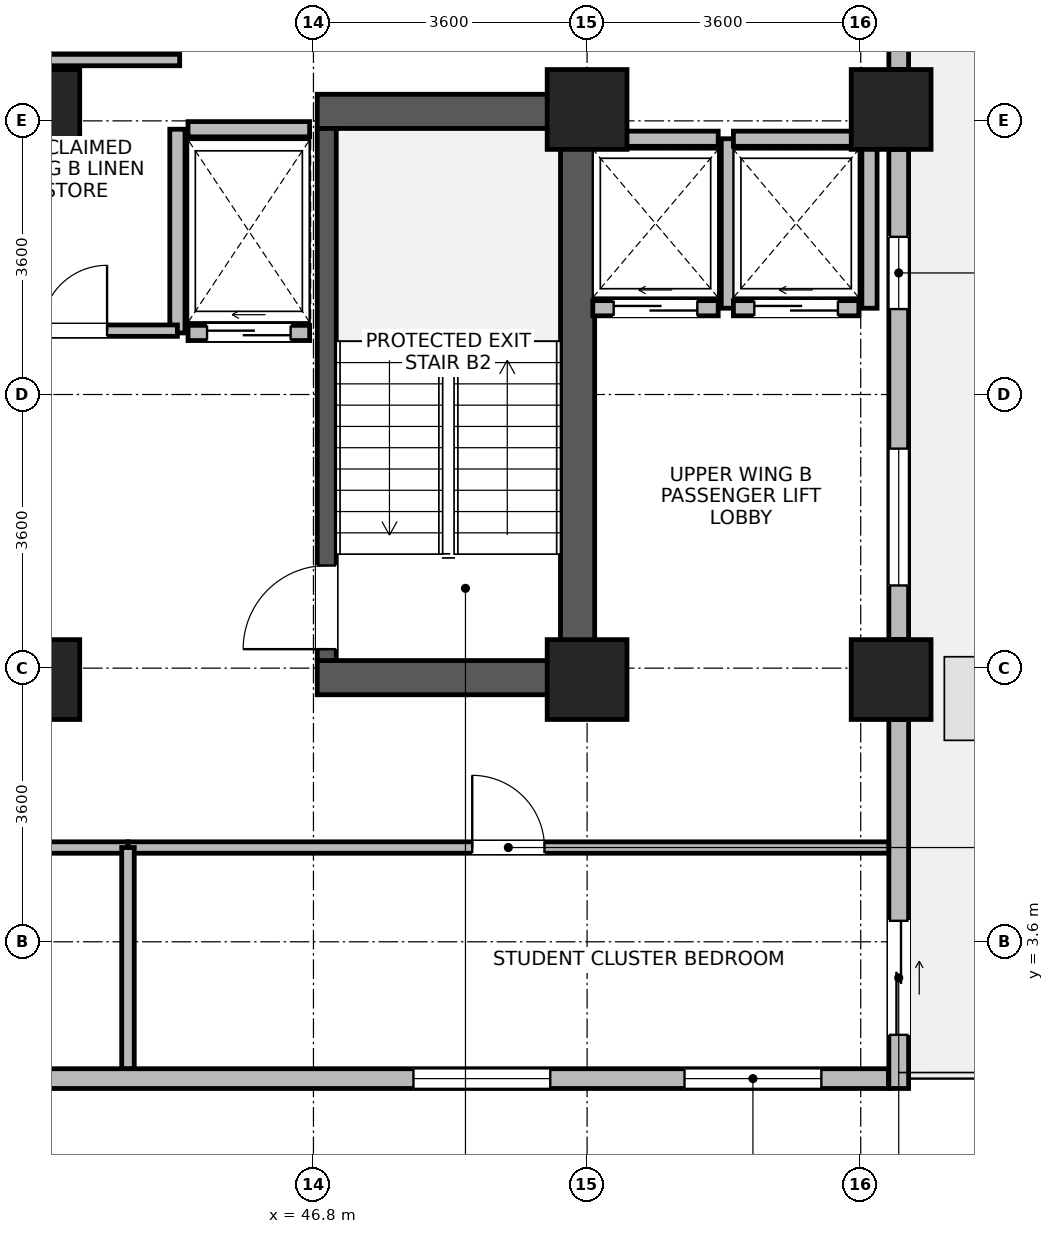
"""IFC4 building model, lengths in metres.
Left out: names, types, materials, properties, quantities, classifications, styles, units other than length and angle.
Written with IfcOpenShell. Run it as: python <this file> out.ifc"""

import sys

from ifc_helpers import new_model, si_unit, direction, frame, frame_2d, origin, origin_2d, place, context, subcontext, project, spatial, rectangle, extrude, source, transform, mapped, element, fill, save


model = new_model("IFC4")
c1 = context("Model", 3, precision=1e-05, world=origin(), true_north=direction((0.0, 1.0)))
c2 = subcontext(c1, "Body", "Model", "MODEL_VIEW")
j1 = project(units=[si_unit("LENGTHUNIT", "METRE"), si_unit("PLANEANGLEUNIT", "RADIAN")], contexts=[c1])
p1 = place(None, origin())
s1 = spatial("IfcSite", under=j1, at=p1, CompositionType="ELEMENT")
p2 = place(p1, origin())
s2 = spatial("IfcBuilding", under=s1, at=p2, CompositionType="ELEMENT")
p3 = place(p2, frame((0.0, 0.0, 188.3)))
s3 = spatial("IfcBuildingStorey", under=s2, at=p3, CompositionType="ELEMENT", Elevation=188.3)
p4 = place(p3, frame((50.275, 6.85, 0.0), z_axis=(0.0, 0.0, 1.0), x_axis=(0.0, 1.0, 0.0)))
e1 = element("IfcWall", 1, at=p4, inside=s3, PredefinedType="SHEAR", context=c2, shape_type="SweptSolid", body=[
    extrude(rectangle(XDim=7.9, YDim=0.45, at=frame_2d((3.95, 0.0))), origin(), (0.0, 0.0, 1.0), 3.34),
])
for number, where, z_axis, x_axis in (
    (2, (46.85, 7.075, 0.0), (0.0, 0.0, 1.0), (1.0, 0.0, 0.0)),
    (3, (46.85, 14.525, 0.0), (0.0, 0.0, 1.0), (1.0, 0.0, 0.0)),
):
    element("IfcWall", number, at=place(p3, frame(where, z_axis=z_axis, x_axis=x_axis)), inside=s3, PredefinedType="SHEAR", context=c2, shape_type="SweptSolid", body=[
        extrude(rectangle(XDim=3.2, YDim=0.45, at=frame_2d((1.6, 0.0))), origin(), (0.0, 0.0, 1.0), 3.34),
    ])
p5 = place(p3, frame((46.975, 7.3, 0.0), z_axis=(0.0, 0.0, 1.0), x_axis=(0.0, 1.0, 0.0)))
e4 = element("IfcWall", 4, at=p5, inside=s3, PredefinedType="SHEAR", context=c2, shape_type="SweptSolid", body=[
    extrude(rectangle(XDim=7.0, YDim=0.25, at=frame_2d((3.5, 0.0))), origin(), (0.0, 0.0, 1.0), 3.34),
])
p6 = place(p5, frame((0.15, 0.0, 0.0)))
e5 = element("IfcOpeningElement", 5, at=p6, cuts=e4, PredefinedType="OPENING", context=c2, shape_type="SweptSolid", body=[
    extrude(rectangle(XDim=1.1, YDim=2.08, at=frame_2d((0.55, 1.04))), frame((0.0, 0.135, 0.0), z_axis=(0.0, -1.0, 0.0), x_axis=(1.0, 0.0, 0.0)), (0.0, 0.0, 1.0), 0.27),
])
m1 = source(origin(), c2, "Body", "SweptSolid", [
    extrude(rectangle(XDim=1.05, YDim=1.05, at=origin_2d()), origin(), (0.0, 0.0, 1.0), 3.7),
])
for number, where, z_axis, x_axis in (
    (6, (43.2, 7.05, 0.0), (0.0, 0.0, 1.0), (1.0, 0.0, 0.0)),
    (7, (43.2, 14.55, 0.0), (0.0, 0.0, 1.0), (1.0, 0.0, 0.0)),
    (8, (50.4, 7.05, 0.0), (0.0, 0.0, 1.0), (1.0, 0.0, 0.0)),
    (9, (50.4, 14.55, 0.0), (0.0, 0.0, 1.0), (1.0, 0.0, 0.0)),
    (10, (54.4, 7.05, 0.0), (0.0, 0.0, 1.0), (1.0, 0.0, 0.0)),
    (11, (54.4, 14.55, 0.0), (0.0, 0.0, 1.0), (1.0, 0.0, 0.0)),
):
    element("IfcColumn", number, at=place(p3, frame(where, z_axis=z_axis, x_axis=x_axis)), inside=s3, PredefinedType="COLUMN", context=c2, shape_type="MappedRepresentation", body=[
        mapped(m1, transform((0.0, 0.0, 0.0), x_axis=(1.0, 0.0, 0.0), y_axis=(0.0, 1.0, 0.0), z_axis=(0.0, 0.0, 1.0), scale=1.0)),
    ])
p7 = place(p3, frame((54.365, 1.8, 0.0), z_axis=(0.0, 0.0, 1.0), x_axis=(-1.0, 0.0, 0.0)))
e12 = element("IfcWall", 12, at=p7, inside=s3, PredefinedType="STANDARD", context=c2, shape_type="SweptSolid", body=[
    extrude(rectangle(XDim=28.53, YDim=0.26, at=frame_2d((14.265, 0.0))), origin(), (0.0, 0.0, 1.0), 3.32),
])
p8 = place(p7, frame((0.883, 0.0, 0.85)))
e13 = element("IfcOpeningElement", 13, at=p8, cuts=e12, PredefinedType="OPENING", context=c2, shape_type="SweptSolid", body=[
    extrude(rectangle(XDim=1.8, YDim=1.85, at=frame_2d((0.9, 0.925))), frame((0.0, 0.14, 0.0), z_axis=(0.0, -1.0, 0.0), x_axis=(1.0, 0.0, 0.0)), (0.0, 0.0, 1.0), 0.28),
])
p9 = place(p7, frame((4.449, 0.0, 0.85)))
e14 = element("IfcOpeningElement", 14, at=p9, cuts=e12, PredefinedType="OPENING", context=c2, shape_type="SweptSolid", body=[
    extrude(rectangle(XDim=1.8, YDim=1.85, at=frame_2d((0.9, 0.925))), frame((0.0, 0.14, 0.0), z_axis=(0.0, -1.0, 0.0), x_axis=(1.0, 0.0, 0.0)), (0.0, 0.0, 1.0), 0.28),
])
p10 = place(p7, frame((11.582, 0.0, 0.85)))
e15 = element("IfcOpeningElement", 15, at=p10, cuts=e12, PredefinedType="OPENING", context=c2, shape_type="SweptSolid", body=[
    extrude(rectangle(XDim=1.8, YDim=1.85, at=frame_2d((0.9, 0.925))), frame((0.0, 0.14, 0.0), z_axis=(0.0, -1.0, 0.0), x_axis=(1.0, 0.0, 0.0)), (0.0, 0.0, 1.0), 0.28),
])
p11 = place(p7, frame((15.148, 0.0, 0.85)))
e16 = element("IfcOpeningElement", 16, at=p11, cuts=e12, PredefinedType="OPENING", context=c2, shape_type="SweptSolid", body=[
    extrude(rectangle(XDim=1.8, YDim=1.85, at=frame_2d((0.9, 0.925))), frame((0.0, 0.14, 0.0), z_axis=(0.0, -1.0, 0.0), x_axis=(1.0, 0.0, 0.0)), (0.0, 0.0, 1.0), 0.28),
])
p12 = place(p7, frame((18.714, 0.0, 0.85)))
e17 = element("IfcOpeningElement", 17, at=p12, cuts=e12, PredefinedType="OPENING", context=c2, shape_type="SweptSolid", body=[
    extrude(rectangle(XDim=1.8, YDim=1.85, at=frame_2d((0.9, 0.925))), frame((0.0, 0.14, 0.0), z_axis=(0.0, -1.0, 0.0), x_axis=(1.0, 0.0, 0.0)), (0.0, 0.0, 1.0), 0.28),
])
p13 = place(p7, frame((22.281, 0.0, 0.85)))
e18 = element("IfcOpeningElement", 18, at=p13, cuts=e12, PredefinedType="OPENING", context=c2, shape_type="SweptSolid", body=[
    extrude(rectangle(XDim=1.8, YDim=1.85, at=frame_2d((0.9, 0.925))), frame((0.0, 0.14, 0.0), z_axis=(0.0, -1.0, 0.0), x_axis=(1.0, 0.0, 0.0)), (0.0, 0.0, 1.0), 0.28),
])
p14 = place(p7, frame((25.847, 0.0, 0.85)))
e19 = element("IfcOpeningElement", 19, at=p14, cuts=e12, PredefinedType="OPENING", context=c2, shape_type="SweptSolid", body=[
    extrude(rectangle(XDim=1.8, YDim=1.85, at=frame_2d((0.9, 0.925))), frame((0.0, 0.14, 0.0), z_axis=(0.0, -1.0, 0.0), x_axis=(1.0, 0.0, 0.0)), (0.0, 0.0, 1.0), 0.28),
])
p15 = place(p3, frame((54.5, 6.524, 0.0), z_axis=(0.0, 0.0, 1.0), x_axis=(0.0, -1.0, 0.0)))
e20 = element("IfcWall", 20, at=p15, inside=s3, PredefinedType="STANDARD", context=c2, shape_type="SweptSolid", body=[
    extrude(rectangle(XDim=4.854, YDim=0.26, at=frame_2d((2.427, 0.0))), origin(), (0.0, 0.0, 1.0), 3.32),
])
p16 = place(p15, frame((2.648, 0.0, 0.0)))
e21 = element("IfcOpeningElement", 21, at=p16, cuts=e20, PredefinedType="OPENING", context=c2, shape_type="SweptSolid", body=[
    extrude(rectangle(XDim=1.5, YDim=2.15, at=frame_2d((0.75, 1.075))), frame((0.0, 0.14, 0.0), z_axis=(0.0, -1.0, 0.0), x_axis=(1.0, 0.0, 0.0)), (0.0, 0.0, 1.0), 0.28),
])
p17 = place(p3, frame((54.5, 14.024, 0.0), z_axis=(0.0, 0.0, 1.0), x_axis=(0.0, -1.0, 0.0)))
e22 = element("IfcWall", 22, at=p17, inside=s3, PredefinedType="STANDARD", context=c2, shape_type="SweptSolid", body=[
    extrude(rectangle(XDim=6.448, YDim=0.26, at=frame_2d((3.224, 0.0))), origin(), (0.0, 0.0, 1.0), 2.87),
])
p18 = place(p17, frame((3.936, 0.0, 0.85)))
e23 = element("IfcOpeningElement", 23, at=p18, cuts=e22, PredefinedType="OPENING", context=c2, shape_type="SweptSolid", body=[
    extrude(rectangle(XDim=1.8, YDim=1.85, at=frame_2d((0.9, 0.925))), frame((0.0, 0.14, 0.0), z_axis=(0.0, -1.0, 0.0), x_axis=(1.0, 0.0, 0.0)), (0.0, 0.0, 1.0), 0.28),
])
p19 = place(p17, frame((1.15, 0.0, 0.85)))
e24 = element("IfcOpeningElement", 24, at=p19, cuts=e22, PredefinedType="OPENING", context=c2, shape_type="SweptSolid", body=[
    extrude(rectangle(XDim=0.95, YDim=1.75, at=frame_2d((0.475, 0.875))), frame((0.0, 0.14, 0.0), z_axis=(0.0, -1.0, 0.0), x_axis=(1.0, 0.0, 0.0)), (0.0, 0.0, 1.0), 0.28),
])
p20 = place(p3, frame((54.5, 21.074, 0.0), z_axis=(0.0, 0.0, 1.0), x_axis=(0.0, -1.0, 0.0)))
e25 = element("IfcWall", 25, at=p20, inside=s3, PredefinedType="STANDARD", context=c2, shape_type="SweptSolid", body=[
    extrude(rectangle(XDim=5.998, YDim=0.26, at=frame_2d((2.999, 0.0))), origin(), (0.0, 0.0, 1.0), 2.87),
])
p21 = place(p20, frame((0.6, 0.0, 0.85)))
e26 = element("IfcOpeningElement", 26, at=p21, cuts=e25, PredefinedType="OPENING", context=c2, shape_type="SweptSolid", body=[
    extrude(rectangle(XDim=1.8, YDim=1.85, at=frame_2d((0.9, 0.925))), frame((0.0, 0.14, 0.0), z_axis=(0.0, -1.0, 0.0), x_axis=(1.0, 0.0, 0.0)), (0.0, 0.0, 1.0), 0.28),
])
p22 = place(p3, frame((50.475, 11.935, 0.0), z_axis=(0.0, 0.0, 1.0), x_axis=(1.0, 0.0, 0.0)))
e27 = element("IfcWall", 27, at=p22, inside=s3, PredefinedType="PARTITIONING", context=c2, shape_type="SweptSolid", body=[
    extrude(rectangle(XDim=1.65, YDim=0.2, at=frame_2d((0.825, 0.0))), origin(), (0.0, 0.0, 1.0), 3.32),
])
p23 = place(p22, frame((0.275, 0.0, 0.0)))
e28 = element("IfcOpeningElement", 28, at=p23, cuts=e27, PredefinedType="OPENING", context=c2, shape_type="SweptSolid", body=[
    extrude(rectangle(XDim=1.1, YDim=2.12, at=frame_2d((0.55, 1.06))), frame((0.0, 0.11, 0.0), z_axis=(0.0, -1.0, 0.0), x_axis=(1.0, 0.0, 0.0)), (0.0, 0.0, 1.0), 0.22),
])
p24 = place(p3, frame((50.475, 14.165, 0.0), z_axis=(0.0, 0.0, 1.0), x_axis=(1.0, 0.0, 0.0)))
e29 = element("IfcWall", 29, at=p24, inside=s3, PredefinedType="PARTITIONING", context=c2, shape_type="SweptSolid", body=[
    extrude(rectangle(XDim=1.65, YDim=0.2, at=frame_2d((0.825, 0.0))), origin(), (0.0, 0.0, 1.0), 3.32),
])
p25 = place(p3, frame((52.265, 11.935, 0.0), z_axis=(0.0, 0.0, 1.0), x_axis=(0.0, 1.0, 0.0)))
e30 = element("IfcWall", 30, at=p25, inside=s3, PredefinedType="PARTITIONING", context=c2, shape_type="SweptSolid", body=[
    extrude(rectangle(XDim=2.23, YDim=0.2, at=frame_2d((1.115, 0.0))), origin(), (0.0, 0.0, 1.0), 3.32),
])
p26 = place(p3, frame((52.325, 11.935, 0.0), z_axis=(0.0, 0.0, 1.0), x_axis=(1.0, 0.0, 0.0)))
e31 = element("IfcWall", 31, at=p26, inside=s3, PredefinedType="PARTITIONING", context=c2, shape_type="SweptSolid", body=[
    extrude(rectangle(XDim=1.65, YDim=0.2, at=frame_2d((0.825, 0.0))), origin(), (0.0, 0.0, 1.0), 3.32),
])
p27 = place(p26, frame((0.275, 0.0, 0.0)))
e32 = element("IfcOpeningElement", 32, at=p27, cuts=e31, PredefinedType="OPENING", context=c2, shape_type="SweptSolid", body=[
    extrude(rectangle(XDim=1.1, YDim=2.12, at=frame_2d((0.55, 1.06))), frame((0.0, 0.11, 0.0), z_axis=(0.0, -1.0, 0.0), x_axis=(1.0, 0.0, 0.0)), (0.0, 0.0, 1.0), 0.22),
])
p28 = place(p3, frame((52.325, 14.165, 0.0), z_axis=(0.0, 0.0, 1.0), x_axis=(1.0, 0.0, 0.0)))
e33 = element("IfcWall", 33, at=p28, inside=s3, PredefinedType="PARTITIONING", context=c2, shape_type="SweptSolid", body=[
    extrude(rectangle(XDim=1.65, YDim=0.2, at=frame_2d((0.825, 0.0))), origin(), (0.0, 0.0, 1.0), 3.32),
])
p29 = place(p3, frame((54.115, 11.935, 0.0), z_axis=(0.0, 0.0, 1.0), x_axis=(0.0, 1.0, 0.0)))
e34 = element("IfcWall", 34, at=p29, inside=s3, PredefinedType="PARTITIONING", context=c2, shape_type="SweptSolid", body=[
    extrude(rectangle(XDim=2.23, YDim=0.2, at=frame_2d((1.115, 0.0))), origin(), (0.0, 0.0, 1.0), 2.87),
])
p30 = place(p3, frame((45.15, 11.61, 0.0), z_axis=(0.0, 0.0, 1.0), x_axis=(1.0, 0.0, 0.0)))
e35 = element("IfcWall", 35, at=p30, inside=s3, PredefinedType="PARTITIONING", context=c2, shape_type="SweptSolid", body=[
    extrude(rectangle(XDim=1.6, YDim=0.2, at=frame_2d((0.8, 0.0))), origin(), (0.0, 0.0, 1.0), 3.32),
])
p31 = place(p30, frame((0.25, 0.0, 0.0)))
e36 = element("IfcOpeningElement", 36, at=p31, cuts=e35, PredefinedType="OPENING", context=c2, shape_type="SweptSolid", body=[
    extrude(rectangle(XDim=1.1, YDim=2.12, at=frame_2d((0.55, 1.06))), frame((0.0, 0.11, 0.0), z_axis=(0.0, -1.0, 0.0), x_axis=(1.0, 0.0, 0.0)), (0.0, 0.0, 1.0), 0.22),
])
p32 = place(p3, frame((45.15, 14.29, 0.0), z_axis=(0.0, 0.0, 1.0), x_axis=(1.0, 0.0, 0.0)))
e37 = element("IfcWall", 37, at=p32, inside=s3, PredefinedType="PARTITIONING", context=c2, shape_type="SweptSolid", body=[
    extrude(rectangle(XDim=1.6, YDim=0.2, at=frame_2d((0.8, 0.0))), origin(), (0.0, 0.0, 1.0), 2.32),
])
p33 = place(p3, frame((45.01, 11.61, 0.0), z_axis=(0.0, 0.0, 1.0), x_axis=(0.0, 1.0, 0.0)))
e38 = element("IfcWall", 38, at=p33, inside=s3, PredefinedType="PARTITIONING", context=c2, shape_type="SweptSolid", body=[
    extrude(rectangle(XDim=2.68, YDim=0.2, at=frame_2d((1.34, 0.0))), origin(), (0.0, 0.0, 1.0), 3.32),
])
p34 = place(p3, frame((33.44, 4.84, 0.0), z_axis=(0.0, 0.0, 1.0), x_axis=(1.0, 0.0, 0.0)))
e39 = element("IfcWall", 39, at=p34, inside=s3, PredefinedType="PARTITIONING", context=c2, shape_type="SweptSolid", body=[
    extrude(rectangle(XDim=10.92, YDim=0.15, at=frame_2d((5.46, 0.0))), origin(), (0.0, 0.0, 1.0), 3.32),
])
p35 = place(p34, frame((4.81, 0.0, 0.0)))
e40 = element("IfcOpeningElement", 40, at=p35, cuts=e39, PredefinedType="OPENING", context=c2, shape_type="SweptSolid", body=[
    extrude(rectangle(XDim=1.3, YDim=2.12, at=frame_2d((0.65, 1.06))), frame((0.0, 0.085, 0.0), z_axis=(0.0, -1.0, 0.0), x_axis=(1.0, 0.0, 0.0)), (0.0, 0.0, 1.0), 0.17),
])
p36 = place(p3, frame((44.36, 4.84, 0.0), z_axis=(0.0, 0.0, 1.0), x_axis=(1.0, 0.0, 0.0)))
e41 = element("IfcWall", 41, at=p36, inside=s3, PredefinedType="PARTITIONING", context=c2, shape_type="SweptSolid", body=[
    extrude(rectangle(XDim=10.008, YDim=0.15, at=frame_2d((5.004, 0.0))), origin(), (0.0, 0.0, 1.0), 3.32),
])
p37 = place(p36, frame((4.529, 0.0, 0.0)))
e42 = element("IfcOpeningElement", 42, at=p37, cuts=e41, PredefinedType="OPENING", context=c2, shape_type="SweptSolid", body=[
    extrude(rectangle(XDim=0.95, YDim=2.1, at=frame_2d((0.475, 1.05))), frame((0.0, 0.085, 0.0), z_axis=(0.0, -1.0, 0.0), x_axis=(1.0, 0.0, 0.0)), (0.0, 0.0, 1.0), 0.17),
])
p38 = place(p3, frame((42.3, 11.64, 0.0), z_axis=(0.0, 0.0, 1.0), x_axis=(1.0, 0.0, 0.0)))
e43 = element("IfcWall", 43, at=p38, inside=s3, PredefinedType="PARTITIONING", context=c2, shape_type="SweptSolid", body=[
    extrude(rectangle(XDim=2.71, YDim=0.15, at=frame_2d((1.355, 0.0))), origin(), (0.0, 0.0, 1.0), 3.32),
])
p39 = place(p38, frame((0.925, 0.0, 0.0)))
e44 = element("IfcOpeningElement", 44, at=p39, cuts=e43, PredefinedType="OPENING", context=c2, shape_type="SweptSolid", body=[
    extrude(rectangle(XDim=0.86, YDim=2.02, at=frame_2d((0.43, 1.01))), frame((0.0, 0.085, 0.0), z_axis=(0.0, -1.0, 0.0), x_axis=(1.0, 0.0, 0.0)), (0.0, 0.0, 1.0), 0.17),
])
p40 = place(p3, frame((42.3, 15.2, 0.0), z_axis=(0.0, 0.0, 1.0), x_axis=(1.0, 0.0, 0.0)))
e45 = element("IfcWall", 45, at=p40, inside=s3, PredefinedType="PARTITIONING", context=c2, shape_type="SweptSolid", body=[
    extrude(rectangle(XDim=2.74, YDim=0.15, at=frame_2d((1.37, 0.0))), origin(), (0.0, 0.0, 1.0), 3.32),
])
p41 = place(p3, frame((44.36, 1.932, 0.0), z_axis=(0.0, 0.0, 1.0), x_axis=(0.0, 1.0, 0.0)))
e46 = element("IfcWall", 46, at=p41, inside=s3, PredefinedType="PARTITIONING", context=c2, shape_type="SweptSolid", body=[
    extrude(rectangle(XDim=2.908, YDim=0.165, at=frame_2d((1.454, 0.0))), origin(), (0.0, 0.0, 1.0), 3.32),
])
p42 = place(p8, origin())
e47 = element("IfcWindow", 47, at=p42, inside=s3, PartitioningType="SINGLE_PANEL", PredefinedType="WINDOW", context=c2, shape_type="SweptSolid", body=[
    extrude(rectangle(XDim=1.8, YDim=1.85, at=frame_2d((0.9, 0.925))), frame((0.0, 0.03, 0.0), z_axis=(0.0, -1.0, 0.0), x_axis=(1.0, 0.0, 0.0)), (0.0, 0.0, 1.0), 0.06),
])
fill(e13, e47)
p43 = place(p9, origin())
e48 = element("IfcWindow", 48, at=p43, inside=s3, PartitioningType="SINGLE_PANEL", PredefinedType="WINDOW", context=c2, shape_type="SweptSolid", body=[
    extrude(rectangle(XDim=1.8, YDim=1.85, at=frame_2d((0.9, 0.925))), frame((0.0, 0.03, 0.0), z_axis=(0.0, -1.0, 0.0), x_axis=(1.0, 0.0, 0.0)), (0.0, 0.0, 1.0), 0.06),
])
fill(e14, e48)
p44 = place(p16, origin())
e49 = element("IfcDoor", 49, at=p44, inside=s3, OperationType="SLIDING_TO_LEFT", PredefinedType="DOOR", context=c2, shape_type="SweptSolid", body=[
    extrude(rectangle(XDim=1.5, YDim=2.15, at=frame_2d((0.75, 1.075))), frame((0.0, 0.025, 0.0), z_axis=(0.0, -1.0, 0.0), x_axis=(1.0, 0.0, 0.0)), (0.0, 0.0, 1.0), 0.05),
])
fill(e21, e49)
p45 = place(p18, origin())
e50 = element("IfcWindow", 50, at=p45, inside=s3, PartitioningType="SINGLE_PANEL", PredefinedType="WINDOW", context=c2, shape_type="SweptSolid", body=[
    extrude(rectangle(XDim=1.8, YDim=1.85, at=frame_2d((0.9, 0.925))), frame((0.0, 0.03, 0.0), z_axis=(0.0, -1.0, 0.0), x_axis=(1.0, 0.0, 0.0)), (0.0, 0.0, 1.0), 0.06),
])
fill(e23, e50)
p46 = place(p19, origin())
e51 = element("IfcWindow", 51, at=p46, inside=s3, PartitioningType="SINGLE_PANEL", PredefinedType="WINDOW", context=c2, shape_type="SweptSolid", body=[
    extrude(rectangle(XDim=0.95, YDim=1.75, at=frame_2d((0.475, 0.875))), frame((0.0, 0.03, 0.0), z_axis=(0.0, -1.0, 0.0), x_axis=(1.0, 0.0, 0.0)), (0.0, 0.0, 1.0), 0.06),
])
fill(e24, e51)
p47 = place(p6, origin())
e52 = element("IfcDoor", 52, at=p47, inside=s3, OperationType="SINGLE_SWING_LEFT", PredefinedType="DOOR", context=c2, shape_type="SweptSolid", body=[
    extrude(rectangle(XDim=1.1, YDim=2.08, at=frame_2d((0.55, 1.04))), frame((0.0, 0.025, 0.0), z_axis=(0.0, -1.0, 0.0), x_axis=(1.0, 0.0, 0.0)), (0.0, 0.0, 1.0), 0.05),
])
fill(e5, e52)
p48 = place(p23, origin())
e53 = element("IfcDoor", 53, at=p48, inside=s3, OperationType="SLIDING_TO_LEFT", PredefinedType="DOOR", context=c2, shape_type="SweptSolid", body=[
    extrude(rectangle(XDim=1.1, YDim=2.12, at=frame_2d((0.55, 1.06))), frame((0.0, 0.025, 0.0), z_axis=(0.0, -1.0, 0.0), x_axis=(1.0, 0.0, 0.0)), (0.0, 0.0, 1.0), 0.05),
])
fill(e28, e53)
p49 = place(p27, origin())
e54 = element("IfcDoor", 54, at=p49, inside=s3, OperationType="SLIDING_TO_LEFT", PredefinedType="DOOR", context=c2, shape_type="SweptSolid", body=[
    extrude(rectangle(XDim=1.1, YDim=2.12, at=frame_2d((0.55, 1.06))), frame((0.0, 0.025, 0.0), z_axis=(0.0, -1.0, 0.0), x_axis=(1.0, 0.0, 0.0)), (0.0, 0.0, 1.0), 0.05),
])
fill(e32, e54)
p50 = place(p31, origin())
e55 = element("IfcDoor", 55, at=p50, inside=s3, OperationType="SLIDING_TO_LEFT", PredefinedType="DOOR", context=c2, shape_type="SweptSolid", body=[
    extrude(rectangle(XDim=1.1, YDim=2.12, at=frame_2d((0.55, 1.06))), frame((0.0, 0.025, 0.0), z_axis=(0.0, -1.0, 0.0), x_axis=(1.0, 0.0, 0.0)), (0.0, 0.0, 1.0), 0.05),
])
fill(e36, e55)
p51 = place(p37, origin())
e56 = element("IfcDoor", 56, at=p51, inside=s3, OperationType="SINGLE_SWING_LEFT", PredefinedType="DOOR", context=c2, shape_type="SweptSolid", body=[
    extrude(rectangle(XDim=0.95, YDim=2.1, at=frame_2d((0.475, 1.05))), frame((0.0, 0.025, 0.0), z_axis=(0.0, -1.0, 0.0), x_axis=(1.0, 0.0, 0.0)), (0.0, 0.0, 1.0), 0.05),
])
fill(e42, e56)
p52 = place(p39, origin())
e57 = element("IfcDoor", 57, at=p52, inside=s3, OperationType="SINGLE_SWING_RIGHT", PredefinedType="DOOR", context=c2, shape_type="SweptSolid", body=[
    extrude(rectangle(XDim=0.86, YDim=2.02, at=frame_2d((0.43, 1.01))), frame((0.0, 0.025, 0.0), z_axis=(0.0, -1.0, 0.0), x_axis=(1.0, 0.0, 0.0)), (0.0, 0.0, 1.0), 0.05),
])
fill(e44, e57)
save(model, sys.argv[1])
